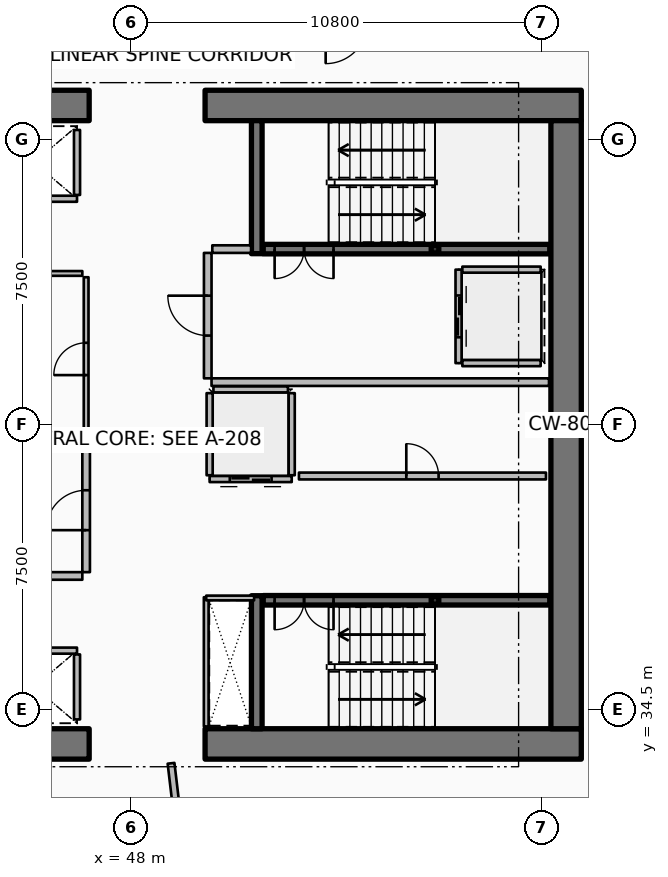
"""IFC4 building model, lengths in metres.
Left out: names, types, materials, properties, quantities, classifications, styles, units other than length and angle.
Written with IfcOpenShell. Run it as: python <this file> out.ifc"""

import sys

from ifc_helpers import new_model, si_unit, direction, frame, frame_2d, origin, origin_2d, place, context, subcontext, project, spatial, rectangle, hollow_rectangle, extrude, element, fill, save


model = new_model("IFC4")
c1 = context("Model", 3, precision=1e-05, world=origin(), true_north=direction((0.0, 1.0)))
c2 = subcontext(c1, "Body", "Model", "MODEL_VIEW")
j1 = project(units=[si_unit("LENGTHUNIT", "METRE"), si_unit("PLANEANGLEUNIT", "RADIAN")], contexts=[c1])
p1 = place(None, origin())
s1 = spatial("IfcSite", under=j1, at=p1, CompositionType="ELEMENT")
p2 = place(p1, origin())
s2 = spatial("IfcBuilding", under=s1, at=p2, CompositionType="ELEMENT")
p3 = place(p2, frame((0.0, 0.0, 161.55)))
s3 = spatial("IfcBuildingStorey", under=s2, at=p3, CompositionType="ELEMENT", Elevation=161.55)
p4 = place(p3, frame((37.0, 33.6, 0.0), z_axis=(0.0, 0.0, 1.0), x_axis=(1.0, 0.0, 0.0)))
e1 = element("IfcWall", 1, at=p4, inside=s3, PredefinedType="SHEAR", context=c2, shape_type="SweptSolid", body=[
    extrude(rectangle(XDim=9.9, YDim=0.8, at=frame_2d((4.95, 0.0))), origin(), (0.0, 0.0, 1.0), 3.75),
])
p5 = place(p3, frame((49.95, 33.6, 0.0), z_axis=(0.0, 0.0, 1.0), x_axis=(1.0, 0.0, 0.0)))
e2 = element("IfcWall", 2, at=p5, inside=s3, PredefinedType="SHEAR", context=c2, shape_type="SweptSolid", body=[
    extrude(rectangle(XDim=9.9, YDim=0.8, at=frame_2d((4.95, 0.0))), origin(), (0.0, 0.0, 1.0), 3.75),
])
p6 = place(p3, frame((37.0, 50.4, 0.0), z_axis=(0.0, 0.0, 1.0), x_axis=(1.0, 0.0, 0.0)))
e3 = element("IfcWall", 3, at=p6, inside=s3, PredefinedType="SHEAR", context=c2, shape_type="SweptSolid", body=[
    extrude(rectangle(XDim=9.9, YDim=0.8, at=frame_2d((4.95, 0.0))), origin(), (0.0, 0.0, 1.0), 3.75),
])
p7 = place(p3, frame((49.95, 50.4, 0.0), z_axis=(0.0, 0.0, 1.0), x_axis=(1.0, 0.0, 0.0)))
e4 = element("IfcWall", 4, at=p7, inside=s3, PredefinedType="SHEAR", context=c2, shape_type="SweptSolid", body=[
    extrude(rectangle(XDim=9.9, YDim=0.8, at=frame_2d((4.95, 0.0))), origin(), (0.0, 0.0, 1.0), 3.75),
])
p8 = place(p3, frame((59.45, 34.0, 0.0), z_axis=(0.0, 0.0, 1.0), x_axis=(0.0, 1.0, 0.0)))
e5 = element("IfcWall", 5, at=p8, inside=s3, PredefinedType="SHEAR", context=c2, shape_type="SweptSolid", body=[
    extrude(rectangle(XDim=16.0, YDim=0.8, at=frame_2d((8.0, 0.0))), origin(), (0.0, 0.0, 1.0), 3.75),
])
for number, where, z_axis, x_axis in (
    (6, (51.31, 46.5, 0.0), (0.0, 0.0, 1.0), (0.0, 1.0, 0.0)),
    (7, (51.31, 34.0, 0.0), (0.0, 0.0, 1.0), (0.0, 1.0, 0.0)),
):
    element("IfcWall", number, at=place(p3, frame(where, z_axis=z_axis, x_axis=x_axis)), inside=s3, PredefinedType="SHEAR", context=c2, shape_type="SweptSolid", body=[
        extrude(rectangle(XDim=3.5, YDim=0.28, at=frame_2d((1.75, 0.0))), origin(), (0.0, 0.0, 1.0), 3.75),
    ])
for number, where, z_axis, x_axis in (
    (8, (56.0, 46.62, 0.0), (0.0, 0.0, 1.0), (1.0, 0.0, 0.0)),
    (9, (56.0, 37.38, 0.0), (0.0, 0.0, 1.0), (1.0, 0.0, 0.0)),
):
    element("IfcColumn", number, at=place(p3, frame(where, z_axis=z_axis, x_axis=x_axis)), inside=s3, PredefinedType="COLUMN", context=c2, shape_type="SweptSolid", body=[
        extrude(hollow_rectangle(XDim=0.2, YDim=0.2, WallThickness=0.01, InnerFilletRadius=0.01, OuterFilletRadius=0.02, at=origin_2d()), origin(), (0.0, 0.0, 1.0), 1.67),
    ])
p9 = place(p3, frame((51.48, 46.62, 0.0), z_axis=(0.0, 0.0, 1.0), x_axis=(1.0, 0.0, 0.0)))
e10 = element("IfcWall", 10, at=p9, inside=s3, PredefinedType="SOLIDWALL", context=c2, shape_type="SweptSolid", body=[
    extrude(rectangle(XDim=7.54, YDim=0.25, at=frame_2d((3.77, 0.0))), origin(), (0.0, 0.0, 1.0), 3.5),
])
p10 = place(p9, frame((0.3, 0.0, 0.0)))
e11 = element("IfcOpeningElement", 11, at=p10, cuts=e10, PredefinedType="OPENING", context=c2, shape_type="SweptSolid", body=[
    extrude(rectangle(XDim=1.55, YDim=2.15, at=frame_2d((0.775, 1.075))), frame((0.0, 0.135, 0.0), z_axis=(0.0, -1.0, 0.0), x_axis=(1.0, 0.0, 0.0)), (0.0, 0.0, 1.0), 0.27),
])
p11 = place(p3, frame((51.48, 37.38, 0.0), z_axis=(0.0, 0.0, 1.0), x_axis=(1.0, 0.0, 0.0)))
e12 = element("IfcWall", 12, at=p11, inside=s3, PredefinedType="SOLIDWALL", context=c2, shape_type="SweptSolid", body=[
    extrude(rectangle(XDim=7.54, YDim=0.25, at=frame_2d((3.77, 0.0))), origin(), (0.0, 0.0, 1.0), 3.5),
])
p12 = place(p11, frame((0.3, 0.0, 0.0)))
e13 = element("IfcOpeningElement", 13, at=p12, cuts=e12, PredefinedType="OPENING", context=c2, shape_type="SweptSolid", body=[
    extrude(rectangle(XDim=1.55, YDim=2.15, at=frame_2d((0.775, 1.075))), frame((0.0, 0.135, 0.0), z_axis=(0.0, -1.0, 0.0), x_axis=(1.0, 0.0, 0.0)), (0.0, 0.0, 1.0), 0.27),
])
p13 = place(p3, frame((46.58, 47.945, 0.0), z_axis=(0.0, 0.0, 1.0), x_axis=(-1.0, 0.0, 0.0)))
e14 = element("IfcWall", 14, at=p13, inside=s3, PredefinedType="PARTITIONING", context=c2, shape_type="SweptSolid", body=[
    extrude(rectangle(XDim=2.26, YDim=0.16, at=frame_2d((1.13, 0.0))), origin(), (0.0, 0.0, 1.0), 3.5),
])
p14 = place(p3, frame((46.58, 48.045, 0.0), z_axis=(0.0, 0.0, 1.0), x_axis=(0.0, 1.0, 0.0)))
e15 = element("IfcWall", 15, at=p14, inside=s3, PredefinedType="PARTITIONING", context=c2, shape_type="SweptSolid", body=[
    extrude(rectangle(XDim=1.71, YDim=0.16, at=frame_2d((0.855, 0.0))), origin(), (0.0, 0.0, 1.0), 3.5),
])
p15 = place(p3, frame((44.32, 36.055, 0.0), z_axis=(0.0, 0.0, 1.0), x_axis=(1.0, 0.0, 0.0)))
e16 = element("IfcWall", 16, at=p15, inside=s3, PredefinedType="PARTITIONING", context=c2, shape_type="SweptSolid", body=[
    extrude(rectangle(XDim=2.26, YDim=0.16, at=frame_2d((1.13, 0.0))), origin(), (0.0, 0.0, 1.0), 3.5),
])
p16 = place(p3, frame((46.58, 34.245, 0.0), z_axis=(0.0, 0.0, 1.0), x_axis=(0.0, 1.0, 0.0)))
e17 = element("IfcWall", 17, at=p16, inside=s3, PredefinedType="PARTITIONING", context=c2, shape_type="SweptSolid", body=[
    extrude(rectangle(XDim=1.71, YDim=0.16, at=frame_2d((0.855, 0.0))), origin(), (0.0, 0.0, 1.0), 3.5),
])
p17 = place(p3, frame((56.62, 46.08, 0.0), z_axis=(0.0, 0.0, 1.0), x_axis=(0.0, -1.0, 0.0)))
e18 = element("IfcWall", 18, at=p17, inside=s3, PredefinedType="PARTITIONING", context=c2, shape_type="SweptSolid", body=[
    extrude(rectangle(XDim=2.46, YDim=0.16, at=frame_2d((1.23, 0.0))), origin(), (0.0, 0.0, 1.0), 3.5),
])
p18 = place(p17, frame((0.68, 0.0, 0.0)))
e19 = element("IfcOpeningElement", 19, at=p18, cuts=e18, PredefinedType="OPENING", context=c2, shape_type="SweptSolid", body=[
    extrude(rectangle(XDim=1.1, YDim=2.1, at=frame_2d((0.55, 1.05))), frame((0.0, 0.09, 0.0), z_axis=(0.0, -1.0, 0.0), x_axis=(1.0, 0.0, 0.0)), (0.0, 0.0, 1.0), 0.18),
])
for number, where, z_axis, x_axis in (
    (20, (56.72, 46.08, 0.0), (0.0, 0.0, 1.0), (1.0, 0.0, 0.0)),
    (21, (56.72, 43.62, 0.0), (0.0, 0.0, 1.0), (1.0, 0.0, 0.0)),
):
    element("IfcWall", number, at=place(p3, frame(where, z_axis=z_axis, x_axis=x_axis)), inside=s3, PredefinedType="PARTITIONING", context=c2, shape_type="SweptSolid", body=[
        extrude(rectangle(XDim=2.06, YDim=0.16, at=frame_2d((1.03, 0.0))), origin(), (0.0, 0.0, 1.0), 3.5),
    ])
p19 = place(p3, frame((52.23, 40.57, 0.0), z_axis=(0.0, 0.0, 1.0), x_axis=(-1.0, 0.0, 0.0)))
e22 = element("IfcWall", 22, at=p19, inside=s3, PredefinedType="PARTITIONING", context=c2, shape_type="SweptSolid", body=[
    extrude(rectangle(XDim=2.16, YDim=0.16, at=frame_2d((1.08, 0.0))), origin(), (0.0, 0.0, 1.0), 3.5),
])
p20 = place(p19, frame((0.53, 0.0, 0.0)))
e23 = element("IfcOpeningElement", 23, at=p20, cuts=e22, PredefinedType="OPENING", context=c2, shape_type="SweptSolid", body=[
    extrude(rectangle(XDim=1.1, YDim=2.1, at=frame_2d((0.55, 1.05))), frame((0.0, 0.09, 0.0), z_axis=(0.0, -1.0, 0.0), x_axis=(1.0, 0.0, 0.0)), (0.0, 0.0, 1.0), 0.18),
])
for number, where, z_axis, x_axis in (
    (24, (52.23, 40.67, 0.0), (0.0, 0.0, 1.0), (0.0, 1.0, 0.0)),
    (25, (50.07, 40.67, 0.0), (0.0, 0.0, 1.0), (0.0, 1.0, 0.0)),
):
    element("IfcWall", number, at=place(p3, frame(where, z_axis=z_axis, x_axis=x_axis)), inside=s3, PredefinedType="PARTITIONING", context=c2, shape_type="SweptSolid", body=[
        extrude(rectangle(XDim=2.16, YDim=0.16, at=frame_2d((1.08, 0.0))), origin(), (0.0, 0.0, 1.0), 3.5),
    ])
p21 = place(p3, frame((50.17, 42.93, 0.0), z_axis=(0.0, 0.0, 1.0), x_axis=(1.0, 0.0, 0.0)))
e26 = element("IfcWall", 26, at=p21, inside=s3, PredefinedType="PARTITIONING", context=c2, shape_type="SweptSolid", body=[
    extrude(rectangle(XDim=1.96, YDim=0.16, at=frame_2d((0.98, 0.0))), origin(), (0.0, 0.0, 1.0), 3.5),
])
p22 = place(p3, frame((52.42, 40.65, 0.0), z_axis=(0.0, 0.0, 1.0), x_axis=(1.0, 0.0, 0.0)))
e27 = element("IfcWall", 27, at=p22, inside=s3, PredefinedType="PARTITIONING", context=c2, shape_type="SweptSolid", body=[
    extrude(rectangle(XDim=6.5, YDim=0.18, at=frame_2d((3.25, 0.0))), origin(), (0.0, 0.0, 1.0), 3.5),
])
p23 = place(p22, frame((2.825, 0.0, 0.0)))
e28 = element("IfcOpeningElement", 28, at=p23, cuts=e27, PredefinedType="OPENING", context=c2, shape_type="SweptSolid", body=[
    extrude(rectangle(XDim=0.85, YDim=2.06, at=frame_2d((0.425, 1.03))), frame((0.0, 0.1, 0.0), z_axis=(0.0, -1.0, 0.0), x_axis=(1.0, 0.0, 0.0)), (0.0, 0.0, 1.0), 0.2),
])
p24 = place(p3, frame((41.35, 38.02, 0.0), z_axis=(0.0, 0.0, 1.0), x_axis=(1.0, 0.0, 0.0)))
e29 = element("IfcWall", 29, at=p24, inside=s3, PredefinedType="PARTITIONING", context=c2, shape_type="SweptSolid", body=[
    extrude(rectangle(XDim=5.37, YDim=0.2, at=frame_2d((2.685, 0.0))), origin(), (0.0, 0.0, 1.0), 3.5),
])
p25 = place(p3, frame((43.92, 41.48, 0.0), z_axis=(0.0, 0.0, 1.0), x_axis=(1.0, 0.0, 0.0)))
e30 = element("IfcWall", 30, at=p25, inside=s3, PredefinedType="PARTITIONING", context=c2, shape_type="SweptSolid", body=[
    extrude(rectangle(XDim=2.8, YDim=0.2, at=frame_2d((1.4, 0.0))), origin(), (0.0, 0.0, 1.0), 3.5),
])
p26 = place(p3, frame((46.82, 38.12, 0.0), z_axis=(0.0, 0.0, 1.0), x_axis=(0.0, 1.0, 0.0)))
e31 = element("IfcWall", 31, at=p26, inside=s3, PredefinedType="PARTITIONING", context=c2, shape_type="SweptSolid", body=[
    extrude(rectangle(XDim=3.26, YDim=0.2, at=frame_2d((1.63, 0.0))), origin(), (0.0, 0.0, 1.0), 3.5),
])
p27 = place(p26, frame((1.105, 0.0, 0.0)))
e32 = element("IfcOpeningElement", 32, at=p27, cuts=e31, PredefinedType="OPENING", context=c2, shape_type="SweptSolid", body=[
    extrude(rectangle(XDim=1.05, YDim=2.1, at=frame_2d((0.525, 1.05))), frame((0.0, 0.11, 0.0), z_axis=(0.0, -1.0, 0.0), x_axis=(1.0, 0.0, 0.0)), (0.0, 0.0, 1.0), 0.22),
])
p28 = place(p3, frame((50.12, 43.12, 0.0), z_axis=(0.0, 0.0, 1.0), x_axis=(1.0, 0.0, 0.0)))
e33 = element("IfcWall", 33, at=p28, inside=s3, PredefinedType="PARTITIONING", context=c2, shape_type="SweptSolid", body=[
    extrude(rectangle(XDim=8.88, YDim=0.2, at=frame_2d((4.44, 0.0))), origin(), (0.0, 0.0, 1.0), 3.5),
])
p29 = place(p3, frame((50.14, 46.62, 0.0), z_axis=(0.0, 0.0, 1.0), x_axis=(1.0, 0.0, 0.0)))
e34 = element("IfcWall", 34, at=p29, inside=s3, PredefinedType="PARTITIONING", context=c2, shape_type="SweptSolid", body=[
    extrude(rectangle(XDim=1.02, YDim=0.2, at=frame_2d((0.51, 0.0))), origin(), (0.0, 0.0, 1.0), 3.5),
])
p30 = place(p3, frame((50.02, 43.22, 0.0), z_axis=(0.0, 0.0, 1.0), x_axis=(0.0, 1.0, 0.0)))
e35 = element("IfcWall", 35, at=p30, inside=s3, PredefinedType="PARTITIONING", context=c2, shape_type="SweptSolid", body=[
    extrude(rectangle(XDim=3.3, YDim=0.2, at=frame_2d((1.65, 0.0))), origin(), (0.0, 0.0, 1.0), 3.5),
])
p31 = place(p30, frame((1.125, 0.0, 0.0)))
e36 = element("IfcOpeningElement", 36, at=p31, cuts=e35, PredefinedType="OPENING", context=c2, shape_type="SweptSolid", body=[
    extrude(rectangle(XDim=1.05, YDim=2.1, at=frame_2d((0.525, 1.05))), frame((0.0, 0.11, 0.0), z_axis=(0.0, -1.0, 0.0), x_axis=(1.0, 0.0, 0.0)), (0.0, 0.0, 1.0), 0.22),
])
p32 = place(p3, frame((41.36, 45.98, 0.0), z_axis=(0.0, 0.0, 1.0), x_axis=(1.0, 0.0, 0.0)))
e37 = element("IfcWall", 37, at=p32, inside=s3, PredefinedType="PARTITIONING", context=c2, shape_type="SweptSolid", body=[
    extrude(rectangle(XDim=5.36, YDim=0.125, at=frame_2d((2.68, 0.0))), origin(), (0.0, 0.0, 1.0), 2.94),
])
p33 = place(p3, frame((49.98, 34.06, 0.0), z_axis=(0.0, 0.0, 1.0), x_axis=(0.0, 1.0, 0.0)))
e38 = element("IfcWall", 38, at=p33, inside=s3, PredefinedType="PARTITIONING", context=c2, shape_type="SweptSolid", body=[
    extrude(rectangle(XDim=3.4, YDim=0.125, at=frame_2d((1.7, 0.0))), origin(), (0.0, 0.0, 1.0), 2.94),
])
p34 = place(p3, frame((49.98, 37.44, 0.0), z_axis=(0.0, 0.0, 1.0), x_axis=(1.0, 0.0, 0.0)))
e39 = element("IfcWall", 39, at=p34, inside=s3, PredefinedType="PARTITIONING", context=c2, shape_type="SweptSolid", body=[
    extrude(rectangle(XDim=1.26, YDim=0.125, at=frame_2d((0.63, 0.0))), origin(), (0.0, 0.0, 1.0), 2.94),
])
p35 = place(p3, frame((46.82, 41.58, 0.0), z_axis=(0.0, 0.0, 1.0), x_axis=(0.0, 1.0, 0.0)))
e40 = element("IfcWall", 40, at=p35, inside=s3, PredefinedType="PARTITIONING", context=c2, shape_type="SweptSolid", body=[
    extrude(rectangle(XDim=4.3, YDim=0.125, at=frame_2d((2.15, 0.0))), origin(), (0.0, 0.0, 1.0), 2.94),
])
p36 = place(p35, frame((1.725, 0.0, 0.0)))
e41 = element("IfcOpeningElement", 41, at=p36, cuts=e40, PredefinedType="OPENING", context=c2, shape_type="SweptSolid", body=[
    extrude(rectangle(XDim=0.85, YDim=2.06, at=frame_2d((0.425, 1.03))), frame((0.0, 0.073, 0.0), z_axis=(0.0, -1.0, 0.0), x_axis=(1.0, 0.0, 0.0)), (0.0, 0.0, 1.0), 0.145),
])
p37 = place(p3, frame((49.054, 33.091, 0.0), z_axis=(0.0, 0.0, 1.0), x_axis=(0.117543744731, -0.993067705685, 0.0)))
e42 = element("IfcWall", 42, at=p37, inside=s3, PredefinedType="PARTITIONING", context=c2, shape_type="SweptSolid", body=[
    extrude(rectangle(XDim=12.763, YDim=0.18, at=frame_2d((6.382, 0.0))), origin(), (0.0, 0.0, 1.0), 2.94),
])
p38 = place(p3, frame((63.52, 50.815, 0.0), z_axis=(0.0, 0.0, 1.0), x_axis=(-0.649447526186, 0.760406411553, 0.0)))
e43 = element("IfcWall", 43, at=p38, inside=s3, PredefinedType="PARTITIONING", context=c2, shape_type="SweptSolid", body=[
    extrude(rectangle(XDim=6.753, YDim=0.125, at=frame_2d((3.376, 0.0))), origin(), (0.0, 0.0, 1.0), 2.94),
])
p39 = place(p38, frame((2.926, 0.0, 0.0)))
e44 = element("IfcOpeningElement", 44, at=p39, cuts=e43, PredefinedType="OPENING", context=c2, shape_type="SweptSolid", body=[
    extrude(rectangle(XDim=0.9, YDim=2.08, at=frame_2d((0.45, 1.04))), frame((0.0, 0.073, 0.0), z_axis=(0.0, -1.0, 0.0), x_axis=(1.0, 0.0, 0.0)), (0.0, 0.0, 1.0), 0.145),
])
p40 = place(p10, origin())
e45 = element("IfcDoor", 45, at=p40, inside=s3, OperationType="DOUBLE_DOOR_SINGLE_SWING", PredefinedType="DOOR", context=c2, shape_type="SweptSolid", body=[
    extrude(rectangle(XDim=1.55, YDim=2.15, at=frame_2d((0.775, 1.075))), frame((0.0, 0.025, 0.0), z_axis=(0.0, -1.0, 0.0), x_axis=(1.0, 0.0, 0.0)), (0.0, 0.0, 1.0), 0.05),
])
fill(e11, e45)
p41 = place(p12, origin())
e46 = element("IfcDoor", 46, at=p41, inside=s3, OperationType="DOUBLE_DOOR_SINGLE_SWING", PredefinedType="DOOR", context=c2, shape_type="SweptSolid", body=[
    extrude(rectangle(XDim=1.55, YDim=2.15, at=frame_2d((0.775, 1.075))), frame((0.0, 0.025, 0.0), z_axis=(0.0, -1.0, 0.0), x_axis=(1.0, 0.0, 0.0)), (0.0, 0.0, 1.0), 0.05),
])
fill(e13, e46)
p42 = place(p18, origin())
e47 = element("IfcDoor", 47, at=p42, inside=s3, OperationType="DOUBLE_DOOR_SLIDING", PredefinedType="DOOR", context=c2, shape_type="SweptSolid", body=[
    extrude(rectangle(XDim=1.1, YDim=2.1, at=frame_2d((0.55, 1.05))), frame((0.0, 0.025, 0.0), z_axis=(0.0, -1.0, 0.0), x_axis=(1.0, 0.0, 0.0)), (0.0, 0.0, 1.0), 0.05),
])
fill(e19, e47)
p43 = place(p20, origin())
e48 = element("IfcDoor", 48, at=p43, inside=s3, OperationType="DOUBLE_DOOR_SLIDING", PredefinedType="DOOR", context=c2, shape_type="SweptSolid", body=[
    extrude(rectangle(XDim=1.1, YDim=2.1, at=frame_2d((0.55, 1.05))), frame((0.0, 0.025, 0.0), z_axis=(0.0, -1.0, 0.0), x_axis=(1.0, 0.0, 0.0)), (0.0, 0.0, 1.0), 0.05),
])
fill(e23, e48)
p44 = place(p23, origin())
e49 = element("IfcDoor", 49, at=p44, inside=s3, OperationType="SINGLE_SWING_LEFT", PredefinedType="DOOR", context=c2, shape_type="SweptSolid", body=[
    extrude(rectangle(XDim=0.85, YDim=2.06, at=frame_2d((0.425, 1.03))), frame((0.0, 0.025, 0.0), z_axis=(0.0, -1.0, 0.0), x_axis=(1.0, 0.0, 0.0)), (0.0, 0.0, 1.0), 0.05),
])
fill(e28, e49)
p45 = place(p27, origin())
e50 = element("IfcDoor", 50, at=p45, inside=s3, OperationType="SINGLE_SWING_LEFT", PredefinedType="DOOR", context=c2, shape_type="SweptSolid", body=[
    extrude(rectangle(XDim=1.05, YDim=2.1, at=frame_2d((0.525, 1.05))), frame((0.0, 0.025, 0.0), z_axis=(0.0, -1.0, 0.0), x_axis=(1.0, 0.0, 0.0)), (0.0, 0.0, 1.0), 0.05),
])
fill(e32, e50)
p46 = place(p31, origin())
e51 = element("IfcDoor", 51, at=p46, inside=s3, OperationType="SINGLE_SWING_RIGHT", PredefinedType="DOOR", context=c2, shape_type="SweptSolid", body=[
    extrude(rectangle(XDim=1.05, YDim=2.1, at=frame_2d((0.525, 1.05))), frame((0.0, 0.025, 0.0), z_axis=(0.0, -1.0, 0.0), x_axis=(1.0, 0.0, 0.0)), (0.0, 0.0, 1.0), 0.05),
])
fill(e36, e51)
p47 = place(p36, origin())
e52 = element("IfcDoor", 52, at=p47, inside=s3, OperationType="SINGLE_SWING_LEFT", PredefinedType="DOOR", context=c2, shape_type="SweptSolid", body=[
    extrude(rectangle(XDim=0.85, YDim=2.06, at=frame_2d((0.425, 1.03))), frame((0.0, 0.025, 0.0), z_axis=(0.0, -1.0, 0.0), x_axis=(1.0, 0.0, 0.0)), (0.0, 0.0, 1.0), 0.05),
])
fill(e41, e52)
save(model, sys.argv[1])
